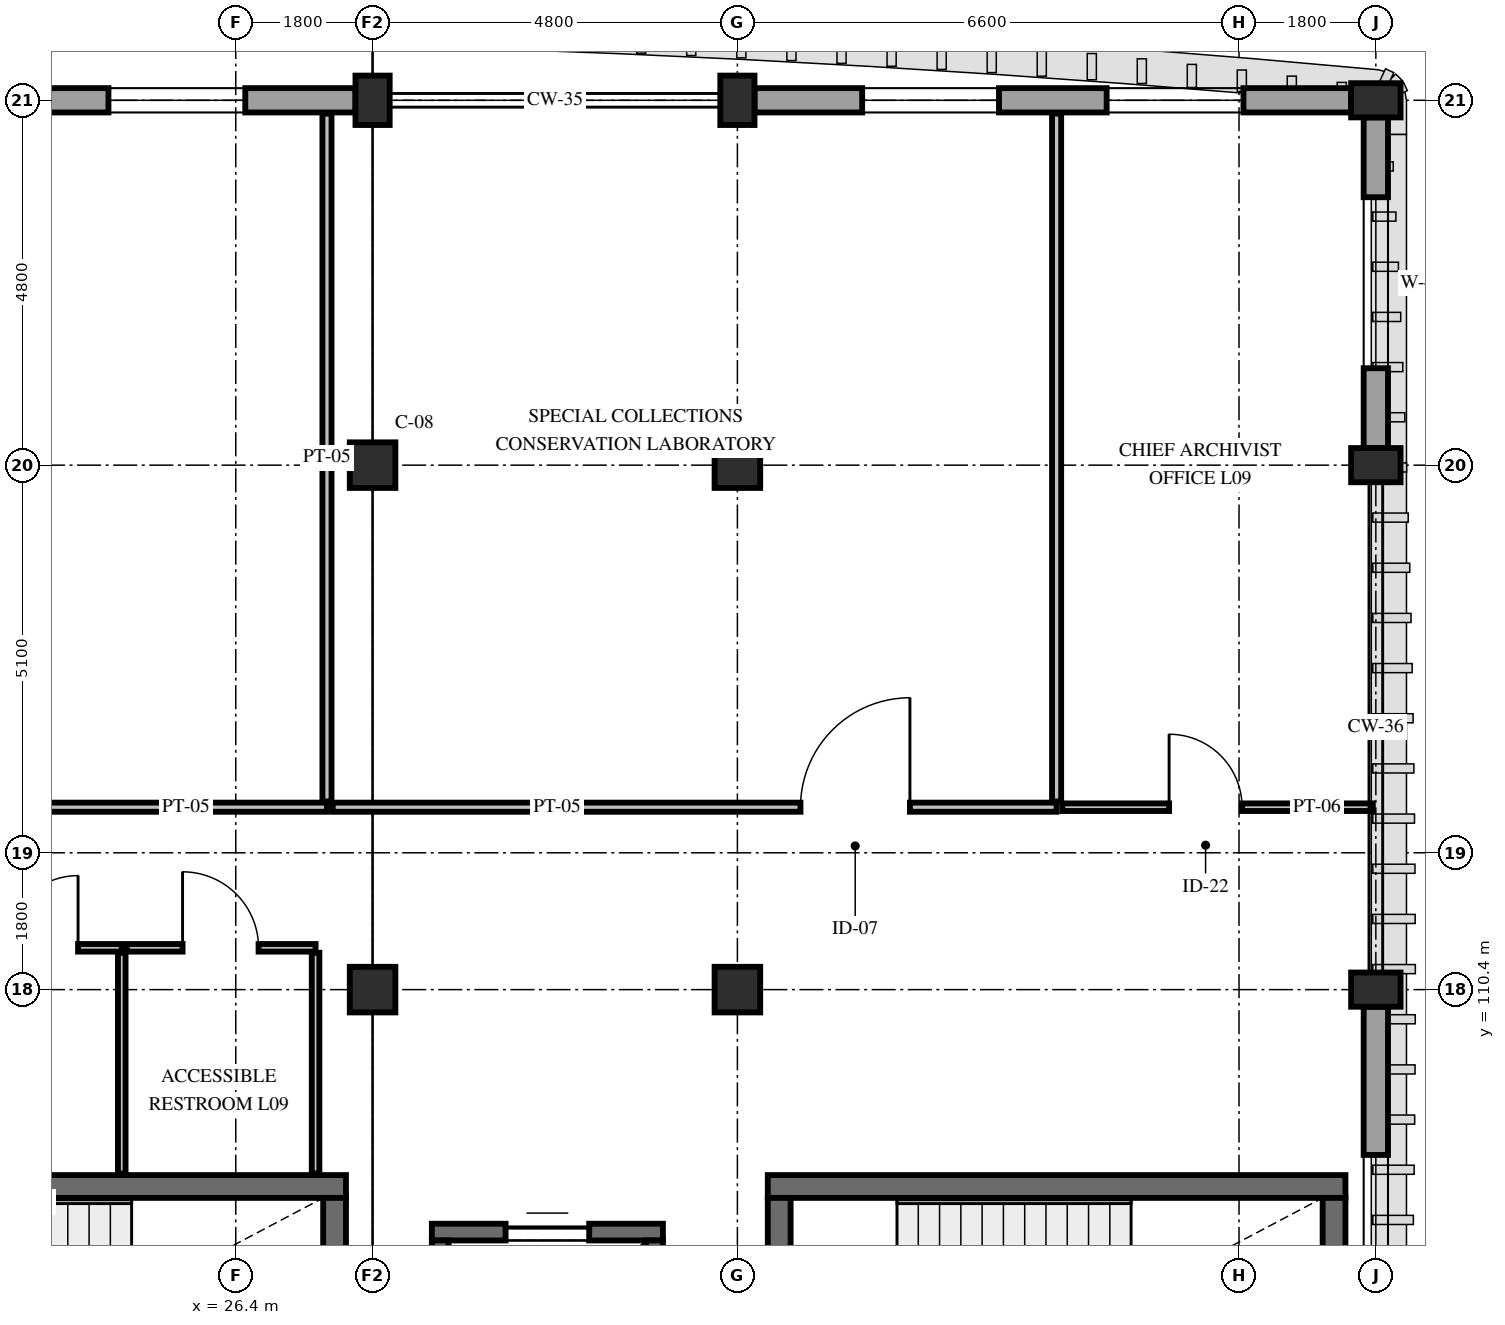
"""IFC4 building model, lengths in metres.
Left out: names, types, materials, properties, quantities, classifications, styles, units other than length and angle.
Written with IfcOpenShell. Run it as: python <this file> out.ifc"""

import sys

from ifc_helpers import new_model, si_unit, direction, frame, frame_2d, origin, origin_2d, place, context, subcontext, project, spatial, rectangle, extrude, element, fill, save


model = new_model("IFC4")
c1 = context("Model", 3, precision=1e-05, world=origin(), true_north=direction((0.0, 1.0)))
c2 = subcontext(c1, "Body", "Model", "MODEL_VIEW")
j1 = project(units=[si_unit("LENGTHUNIT", "METRE"), si_unit("PLANEANGLEUNIT", "RADIAN")], contexts=[c1])
p1 = place(None, origin())
s1 = spatial("IfcSite", under=j1, at=p1, CompositionType="ELEMENT")
p2 = place(p1, origin())
s2 = spatial("IfcBuilding", under=s1, at=p2, CompositionType="ELEMENT")
p3 = place(p2, frame((0.0, 0.0, 42.6)))
s3 = spatial("IfcBuildingStorey", under=s2, at=p3, CompositionType="ELEMENT", Elevation=42.6)
for number, where, z_axis, x_axis in (
    (1, (28.2, 110.4, 0.0), (0.0, 0.0, 1.0), (1.0, 0.0, 0.0)),
    (2, (28.2, 117.3, 0.0), (0.0, 0.0, 1.0), (1.0, 0.0, 0.0)),
):
    element("IfcColumn", number, at=place(p3, frame(where, z_axis=z_axis, x_axis=x_axis)), inside=s3, PredefinedType="COLUMN", context=c2, shape_type="SweptSolid", body=[
        extrude(rectangle(XDim=0.6, YDim=0.6, at=origin_2d()), origin(), (0.0, 0.0, 1.0), 4.2),
    ])
p4 = place(p3, frame((28.2, 122.1, 0.0), z_axis=(0.0, 0.0, 1.0), x_axis=(1.0, 0.0, 0.0)))
e3 = element("IfcColumn", 3, at=p4, inside=s3, PredefinedType="PILASTER", context=c2, shape_type="SweptSolid", body=[
    extrude(rectangle(XDim=0.45, YDim=0.65, at=origin_2d()), origin(), (0.0, 0.0, 1.0), 4.2),
])
for number, where, z_axis, x_axis in (
    (4, (33.0, 110.4, 0.0), (0.0, 0.0, 1.0), (1.0, 0.0, 0.0)),
    (5, (33.0, 117.3, 0.0), (0.0, 0.0, 1.0), (1.0, 0.0, 0.0)),
):
    element("IfcColumn", number, at=place(p3, frame(where, z_axis=z_axis, x_axis=x_axis)), inside=s3, PredefinedType="COLUMN", context=c2, shape_type="SweptSolid", body=[
        extrude(rectangle(XDim=0.6, YDim=0.6, at=origin_2d()), origin(), (0.0, 0.0, 1.0), 4.2),
    ])
for number, where, z_axis, x_axis in (
    (6, (33.0, 122.1, 0.0), (0.0, 0.0, 1.0), (1.0, 0.0, 0.0)),
    (7, (41.4, 110.4, 0.0), (0.0, 0.0, 1.0), (0.0, 1.0, 0.0)),
    (8, (41.4, 117.3, 0.0), (0.0, 0.0, 1.0), (0.0, 1.0, 0.0)),
    (9, (41.4, 122.1, 0.0), (0.0, 0.0, 1.0), (0.0, 1.0, 0.0)),
):
    element("IfcColumn", number, at=place(p3, frame(where, z_axis=z_axis, x_axis=x_axis)), inside=s3, PredefinedType="PILASTER", context=c2, shape_type="SweptSolid", body=[
        extrude(rectangle(XDim=0.45, YDim=0.65, at=origin_2d()), origin(), (0.0, 0.0, 1.0), 4.2),
    ])
p5 = place(p3, frame((20.025, 122.1, 0.0), z_axis=(0.0, 0.0, 1.0), x_axis=(1.0, 0.0, 0.0)))
e10 = element("IfcWall", 10, at=p5, inside=s3, PredefinedType="STANDARD", context=c2, shape_type="SweptSolid", body=[
    extrude(rectangle(XDim=7.95, YDim=0.32, at=frame_2d((3.975, 0.0))), origin(), (0.0, 0.0, 1.0), 3.35),
])
p6 = place(p5, frame((1.45, 0.0, 0.65)))
e11 = element("IfcOpeningElement", 11, at=p6, cuts=e10, PredefinedType="OPENING", context=c2, shape_type="SweptSolid", body=[
    extrude(rectangle(XDim=1.8, YDim=2.24, at=frame_2d((0.9, 1.12))), frame((0.0, 0.175, 0.0), z_axis=(0.0, -1.0, 0.0), x_axis=(1.0, 0.0, 0.0)), (0.0, 0.0, 1.0), 0.35),
])
p7 = place(p5, frame((4.7, 0.0, 0.65)))
e12 = element("IfcOpeningElement", 12, at=p7, cuts=e10, PredefinedType="OPENING", context=c2, shape_type="SweptSolid", body=[
    extrude(rectangle(XDim=1.8, YDim=2.24, at=frame_2d((0.9, 1.12))), frame((0.0, 0.175, 0.0), z_axis=(0.0, -1.0, 0.0), x_axis=(1.0, 0.0, 0.0)), (0.0, 0.0, 1.0), 0.35),
])
p8 = place(p3, frame((33.225, 122.1, 0.0), z_axis=(0.0, 0.0, 1.0), x_axis=(1.0, 0.0, 0.0)))
e13 = element("IfcWall", 13, at=p8, inside=s3, PredefinedType="STANDARD", context=c2, shape_type="SweptSolid", body=[
    extrude(rectangle(XDim=7.85, YDim=0.32, at=frame_2d((3.925, 0.0))), origin(), (0.0, 0.0, 1.0), 3.35),
])
p9 = place(p8, frame((1.417, 0.0, 0.65)))
e14 = element("IfcOpeningElement", 14, at=p9, cuts=e13, PredefinedType="OPENING", context=c2, shape_type="SweptSolid", body=[
    extrude(rectangle(XDim=1.8, YDim=2.24, at=frame_2d((0.9, 1.12))), frame((0.0, 0.175, 0.0), z_axis=(0.0, -1.0, 0.0), x_axis=(1.0, 0.0, 0.0)), (0.0, 0.0, 1.0), 0.35),
])
p10 = place(p8, frame((4.633, 0.0, 0.65)))
e15 = element("IfcOpeningElement", 15, at=p10, cuts=e13, PredefinedType="OPENING", context=c2, shape_type="SweptSolid", body=[
    extrude(rectangle(XDim=1.8, YDim=2.24, at=frame_2d((0.9, 1.12))), frame((0.0, 0.175, 0.0), z_axis=(0.0, -1.0, 0.0), x_axis=(1.0, 0.0, 0.0)), (0.0, 0.0, 1.0), 0.35),
])
p11 = place(p3, frame((41.4, 121.875, 0.0), z_axis=(0.0, 0.0, 1.0), x_axis=(0.0, -1.0, 0.0)))
e16 = element("IfcWall", 16, at=p11, inside=s3, PredefinedType="STANDARD", context=c2, shape_type="SweptSolid", body=[
    extrude(rectangle(XDim=4.35, YDim=0.32, at=frame_2d((2.175, 0.0))), origin(), (0.0, 0.0, 1.0), 3.35),
])
p12 = place(p11, frame((1.05, 0.0, 0.65)))
e17 = element("IfcOpeningElement", 17, at=p12, cuts=e16, PredefinedType="OPENING", context=c2, shape_type="SweptSolid", body=[
    extrude(rectangle(XDim=2.25, YDim=2.24, at=frame_2d((1.125, 1.12))), frame((0.0, 0.175, 0.0), z_axis=(0.0, -1.0, 0.0), x_axis=(1.0, 0.0, 0.0)), (0.0, 0.0, 1.0), 0.35),
])
p13 = place(p3, frame((41.4, 110.175, 0.0), z_axis=(0.0, 0.0, 1.0), x_axis=(0.0, -1.0, 0.0)))
e18 = element("IfcWall", 18, at=p13, inside=s3, PredefinedType="STANDARD", context=c2, shape_type="SweptSolid", body=[
    extrude(rectangle(XDim=6.15, YDim=0.32, at=frame_2d((3.075, 0.0))), origin(), (0.0, 0.0, 1.0), 3.23),
])
p14 = place(p13, frame((1.95, 0.0, 0.65)))
e19 = element("IfcOpeningElement", 19, at=p14, cuts=e18, PredefinedType="OPENING", context=c2, shape_type="SweptSolid", body=[
    extrude(rectangle(XDim=2.25, YDim=2.24, at=frame_2d((1.125, 1.12))), frame((0.0, 0.175, 0.0), z_axis=(0.0, -1.0, 0.0), x_axis=(1.0, 0.0, 0.0)), (0.0, 0.0, 1.0), 0.35),
])
p15 = place(p3, frame((20.25, 107.81, 0.0), z_axis=(0.0, 0.0, 1.0), x_axis=(1.0, 0.0, 0.0)))
e20 = element("IfcWall", 20, at=p15, inside=s3, PredefinedType="SHEAR", context=c2, shape_type="SweptSolid", body=[
    extrude(rectangle(XDim=7.6, YDim=0.3, at=frame_2d((3.8, 0.0))), origin(), (0.0, 0.0, 1.0), 3.9),
])
p16 = place(p3, frame((27.7, 104.7, 0.0), z_axis=(0.0, 0.0, 1.0), x_axis=(0.0, 1.0, 0.0)))
e21 = element("IfcWall", 21, at=p16, inside=s3, PredefinedType="SHEAR", context=c2, shape_type="SweptSolid", body=[
    extrude(rectangle(XDim=2.96, YDim=0.3, at=frame_2d((1.48, 0.0))), origin(), (0.0, 0.0, 1.0), 3.9),
])
p17 = place(p3, frame((33.4, 107.81, 0.0), z_axis=(0.0, 0.0, 1.0), x_axis=(1.0, 0.0, 0.0)))
e22 = element("IfcWall", 22, at=p17, inside=s3, PredefinedType="SHEAR", context=c2, shape_type="SweptSolid", body=[
    extrude(rectangle(XDim=7.6, YDim=0.3, at=frame_2d((3.8, 0.0))), origin(), (0.0, 0.0, 1.0), 3.9),
])
p18 = place(p3, frame((33.55, 104.7, 0.0), z_axis=(0.0, 0.0, 1.0), x_axis=(0.0, 1.0, 0.0)))
e23 = element("IfcWall", 23, at=p18, inside=s3, PredefinedType="SHEAR", context=c2, shape_type="SweptSolid", body=[
    extrude(rectangle(XDim=2.96, YDim=0.3, at=frame_2d((1.48, 0.0))), origin(), (0.0, 0.0, 1.0), 3.9),
])
p19 = place(p18, frame((0.94, 0.0, 0.0)))
e24 = element("IfcOpeningElement", 24, at=p19, cuts=e23, PredefinedType="OPENING", context=c2, shape_type="SweptSolid", body=[
    extrude(rectangle(XDim=1.08, YDim=2.2, at=frame_2d((0.54, 1.1))), frame((0.0, 0.165, 0.0), z_axis=(0.0, -1.0, 0.0), x_axis=(1.0, 0.0, 0.0)), (0.0, 0.0, 1.0), 0.33),
])
p20 = place(p3, frame((40.85, 104.7, 0.0), z_axis=(0.0, 0.0, 1.0), x_axis=(0.0, 1.0, 0.0)))
e25 = element("IfcWall", 25, at=p20, inside=s3, PredefinedType="SHEAR", context=c2, shape_type="SweptSolid", body=[
    extrude(rectangle(XDim=2.96, YDim=0.3, at=frame_2d((1.48, 0.0))), origin(), (0.0, 0.0, 1.0), 3.9),
])
p21 = place(p3, frame((28.98, 107.21, 0.0), z_axis=(0.0, 0.0, 1.0), x_axis=(1.0, 0.0, 0.0)))
e26 = element("IfcWall", 26, at=p21, inside=s3, PredefinedType="SHEAR", context=c2, shape_type="SweptSolid", body=[
    extrude(rectangle(XDim=3.04, YDim=0.22, at=frame_2d((1.52, 0.0))), origin(), (0.0, 0.0, 1.0), 3.9),
])
p22 = place(p21, frame((0.97, 0.0, 0.0)))
e27 = element("IfcOpeningElement", 27, at=p22, cuts=e26, PredefinedType="OPENING", context=c2, shape_type="SweptSolid", body=[
    extrude(rectangle(XDim=1.1, YDim=2.2, at=frame_2d((0.55, 1.1))), frame((0.0, 0.125, 0.0), z_axis=(0.0, -1.0, 0.0), x_axis=(1.0, 0.0, 0.0)), (0.0, 0.0, 1.0), 0.25),
])
for number, where, z_axis, x_axis in (
    (28, (29.09, 104.7, 0.0), (0.0, 0.0, 1.0), (0.0, 1.0, 0.0)),
    (29, (31.91, 104.7, 0.0), (0.0, 0.0, 1.0), (0.0, 1.0, 0.0)),
):
    element("IfcWall", number, at=place(p3, frame(where, z_axis=z_axis, x_axis=x_axis)), inside=s3, PredefinedType="SHEAR", context=c2, shape_type="SweptSolid", body=[
        extrude(rectangle(XDim=2.4, YDim=0.22, at=frame_2d((1.2, 0.0))), origin(), (0.0, 0.0, 1.0), 3.9),
    ])
p23 = place(p3, frame((22.815, 110.95, 0.0), z_axis=(0.0, 0.0, 1.0), x_axis=(1.0, 0.0, 0.0)))
e30 = element("IfcWall", 30, at=p23, inside=s3, PredefinedType="PARTITIONING", context=c2, shape_type="SweptSolid", body=[
    extrude(rectangle(XDim=2.085, YDim=0.1, at=frame_2d((1.042, 0.0))), origin(), (0.0, 0.0, 1.0), 3.88),
])
p24 = place(p23, frame((0.56, 0.0, 0.0)))
e31 = element("IfcOpeningElement", 31, at=p24, cuts=e30, PredefinedType="OPENING", context=c2, shape_type="SweptSolid", body=[
    extrude(rectangle(XDim=0.95, YDim=2.15, at=frame_2d((0.475, 1.075))), frame((0.0, 0.065, 0.0), z_axis=(0.0, -1.0, 0.0), x_axis=(1.0, 0.0, 0.0)), (0.0, 0.0, 1.0), 0.13),
])
p25 = place(p3, frame((24.9, 107.98, 0.0), z_axis=(0.0, 0.0, 1.0), x_axis=(0.0, 1.0, 0.0)))
e32 = element("IfcWall", 32, at=p25, inside=s3, PredefinedType="PARTITIONING", context=c2, shape_type="SweptSolid", body=[
    extrude(rectangle(XDim=2.905, YDim=0.1, at=frame_2d((1.453, 0.0))), origin(), (0.0, 0.0, 1.0), 3.23),
])
p26 = place(p3, frame((24.965, 110.95, 0.0), z_axis=(0.0, 0.0, 1.0), x_axis=(1.0, 0.0, 0.0)))
e33 = element("IfcWall", 33, at=p26, inside=s3, PredefinedType="PARTITIONING", context=c2, shape_type="SweptSolid", body=[
    extrude(rectangle(XDim=2.485, YDim=0.1, at=frame_2d((1.242, 0.0))), origin(), (0.0, 0.0, 1.0), 3.745),
])
p27 = place(p26, frame((0.735, 0.0, 0.0)))
e34 = element("IfcOpeningElement", 34, at=p27, cuts=e33, PredefinedType="OPENING", context=c2, shape_type="SweptSolid", body=[
    extrude(rectangle(XDim=1.0, YDim=2.15, at=frame_2d((0.5, 1.075))), frame((0.0, 0.065, 0.0), z_axis=(0.0, -1.0, 0.0), x_axis=(1.0, 0.0, 0.0)), (0.0, 0.0, 1.0), 0.13),
])
p28 = place(p3, frame((27.45, 107.98, 0.0), z_axis=(0.0, 0.0, 1.0), x_axis=(0.0, 1.0, 0.0)))
e35 = element("IfcWall", 35, at=p28, inside=s3, PredefinedType="PARTITIONING", context=c2, shape_type="SweptSolid", body=[
    extrude(rectangle(XDim=2.905, YDim=0.1, at=frame_2d((1.453, 0.0))), origin(), (0.0, 0.0, 1.0), 3.23),
])
p29 = place(p3, frame((18.215, 112.8, 0.0), z_axis=(0.0, 0.0, 1.0), x_axis=(1.0, 0.0, 0.0)))
e36 = element("IfcWall", 36, at=p29, inside=s3, PredefinedType="PARTITIONING", context=c2, shape_type="SweptSolid", body=[
    extrude(rectangle(XDim=9.385, YDim=0.12, at=frame_2d((4.692, 0.0))), origin(), (0.0, 0.0, 1.0), 3.53),
])
p30 = place(p29, frame((3.945, 0.0, 0.0)))
e37 = element("IfcOpeningElement", 37, at=p30, cuts=e36, PredefinedType="OPENING", context=c2, shape_type="SweptSolid", body=[
    extrude(rectangle(XDim=1.48, YDim=2.3, at=frame_2d((0.74, 1.15))), frame((0.0, 0.075, 0.0), z_axis=(0.0, -1.0, 0.0), x_axis=(1.0, 0.0, 0.0)), (0.0, 0.0, 1.0), 0.15),
])
p31 = place(p3, frame((27.6, 112.875, 0.0), z_axis=(0.0, 0.0, 1.0), x_axis=(0.0, 1.0, 0.0)))
e38 = element("IfcWall", 38, at=p31, inside=s3, PredefinedType="PARTITIONING", context=c2, shape_type="SweptSolid", body=[
    extrude(rectangle(XDim=9.05, YDim=0.12, at=frame_2d((4.525, 0.0))), origin(), (0.0, 0.0, 1.0), 3.33),
])
p32 = place(p3, frame((27.675, 112.8, 0.0), z_axis=(0.0, 0.0, 1.0), x_axis=(1.0, 0.0, 0.0)))
e39 = element("IfcWall", 39, at=p32, inside=s3, PredefinedType="PARTITIONING", context=c2, shape_type="SweptSolid", body=[
    extrude(rectangle(XDim=9.525, YDim=0.12, at=frame_2d((4.762, 0.0))), origin(), (0.0, 0.0, 1.0), 3.53),
])
p33 = place(p32, frame((6.155, 0.0, 0.0)))
e40 = element("IfcOpeningElement", 40, at=p33, cuts=e39, PredefinedType="OPENING", context=c2, shape_type="SweptSolid", body=[
    extrude(rectangle(XDim=1.44, YDim=2.25, at=frame_2d((0.72, 1.125))), frame((0.0, 0.075, 0.0), z_axis=(0.0, -1.0, 0.0), x_axis=(1.0, 0.0, 0.0)), (0.0, 0.0, 1.0), 0.15),
])
p34 = place(p3, frame((37.2, 112.875, 0.0), z_axis=(0.0, 0.0, 1.0), x_axis=(0.0, 1.0, 0.0)))
e41 = element("IfcWall", 41, at=p34, inside=s3, PredefinedType="PARTITIONING", context=c2, shape_type="SweptSolid", body=[
    extrude(rectangle(XDim=9.05, YDim=0.12, at=frame_2d((4.525, 0.0))), origin(), (0.0, 0.0, 1.0), 3.33),
])
p35 = place(p3, frame((37.275, 112.8, 0.0), z_axis=(0.0, 0.0, 1.0), x_axis=(1.0, 0.0, 0.0)))
e42 = element("IfcWall", 42, at=p35, inside=s3, PredefinedType="PARTITIONING", context=c2, shape_type="SweptSolid", body=[
    extrude(rectangle(XDim=4.085, YDim=0.1, at=frame_2d((2.042, 0.0))), origin(), (0.0, 0.0, 1.0), 3.48),
])
p36 = place(p35, frame((1.405, 0.0, 0.0)))
e43 = element("IfcOpeningElement", 43, at=p36, cuts=e42, PredefinedType="OPENING", context=c2, shape_type="SweptSolid", body=[
    extrude(rectangle(XDim=0.96, YDim=2.15, at=frame_2d((0.48, 1.075))), frame((0.0, 0.065, 0.0), z_axis=(0.0, -1.0, 0.0), x_axis=(1.0, 0.0, 0.0)), (0.0, 0.0, 1.0), 0.13),
])
p37 = place(p7, origin())
e44 = element("IfcWindow", 44, at=p37, inside=s3, PartitioningType="DOUBLE_PANEL_VERTICAL", PredefinedType="WINDOW", context=c2, shape_type="SweptSolid", body=[
    extrude(rectangle(XDim=1.8, YDim=2.24, at=frame_2d((0.9, 1.12))), frame((0.0, 0.03, 0.0), z_axis=(0.0, -1.0, 0.0), x_axis=(1.0, 0.0, 0.0)), (0.0, 0.0, 1.0), 0.06),
])
fill(e12, e44)
p38 = place(p9, origin())
e45 = element("IfcWindow", 45, at=p38, inside=s3, PartitioningType="DOUBLE_PANEL_VERTICAL", PredefinedType="WINDOW", context=c2, shape_type="SweptSolid", body=[
    extrude(rectangle(XDim=1.8, YDim=2.24, at=frame_2d((0.9, 1.12))), frame((0.0, 0.03, 0.0), z_axis=(0.0, -1.0, 0.0), x_axis=(1.0, 0.0, 0.0)), (0.0, 0.0, 1.0), 0.06),
])
fill(e14, e45)
p39 = place(p10, origin())
e46 = element("IfcWindow", 46, at=p39, inside=s3, PartitioningType="DOUBLE_PANEL_VERTICAL", PredefinedType="WINDOW", context=c2, shape_type="SweptSolid", body=[
    extrude(rectangle(XDim=1.8, YDim=2.24, at=frame_2d((0.9, 1.12))), frame((0.0, 0.03, 0.0), z_axis=(0.0, -1.0, 0.0), x_axis=(1.0, 0.0, 0.0)), (0.0, 0.0, 1.0), 0.06),
])
fill(e15, e46)
p40 = place(p12, origin())
e47 = element("IfcWindow", 47, at=p40, inside=s3, PartitioningType="DOUBLE_PANEL_VERTICAL", PredefinedType="WINDOW", context=c2, shape_type="SweptSolid", body=[
    extrude(rectangle(XDim=2.25, YDim=2.24, at=frame_2d((1.125, 1.12))), frame((0.0, 0.03, 0.0), z_axis=(0.0, -1.0, 0.0), x_axis=(1.0, 0.0, 0.0)), (0.0, 0.0, 1.0), 0.06),
])
fill(e17, e47)
p41 = place(p14, origin())
e48 = element("IfcWindow", 48, at=p41, inside=s3, PartitioningType="DOUBLE_PANEL_VERTICAL", PredefinedType="WINDOW", context=c2, shape_type="SweptSolid", body=[
    extrude(rectangle(XDim=2.25, YDim=2.24, at=frame_2d((1.125, 1.12))), frame((0.0, 0.03, 0.0), z_axis=(0.0, -1.0, 0.0), x_axis=(1.0, 0.0, 0.0)), (0.0, 0.0, 1.0), 0.06),
])
fill(e19, e48)
p42 = place(p22, origin())
e49 = element("IfcDoor", 49, at=p42, inside=s3, OperationType="SLIDING_TO_LEFT", PredefinedType="DOOR", context=c2, shape_type="SweptSolid", body=[
    extrude(rectangle(XDim=1.1, YDim=2.2, at=frame_2d((0.55, 1.1))), frame((0.0, 0.025, 0.0), z_axis=(0.0, -1.0, 0.0), x_axis=(1.0, 0.0, 0.0)), (0.0, 0.0, 1.0), 0.05),
])
fill(e27, e49)
p43 = place(p24, origin())
e50 = element("IfcDoor", 50, at=p43, inside=s3, OperationType="SINGLE_SWING_RIGHT", PredefinedType="DOOR", context=c2, shape_type="SweptSolid", body=[
    extrude(rectangle(XDim=0.95, YDim=2.15, at=frame_2d((0.475, 1.075))), frame((0.0, 0.025, 0.0), z_axis=(0.0, -1.0, 0.0), x_axis=(1.0, 0.0, 0.0)), (0.0, 0.0, 1.0), 0.05),
])
fill(e31, e50)
p44 = place(p27, origin())
e51 = element("IfcDoor", 51, at=p44, inside=s3, OperationType="SINGLE_SWING_LEFT", PredefinedType="DOOR", context=c2, shape_type="SweptSolid", body=[
    extrude(rectangle(XDim=1.0, YDim=2.15, at=frame_2d((0.5, 1.075))), frame((0.0, 0.025, 0.0), z_axis=(0.0, -1.0, 0.0), x_axis=(1.0, 0.0, 0.0)), (0.0, 0.0, 1.0), 0.05),
])
fill(e34, e51)
p45 = place(p33, origin())
e52 = element("IfcDoor", 52, at=p45, inside=s3, OperationType="SINGLE_SWING_RIGHT", PredefinedType="DOOR", context=c2, shape_type="SweptSolid", body=[
    extrude(rectangle(XDim=1.44, YDim=2.25, at=frame_2d((0.72, 1.125))), frame((0.0, 0.025, 0.0), z_axis=(0.0, -1.0, 0.0), x_axis=(1.0, 0.0, 0.0)), (0.0, 0.0, 1.0), 0.05),
])
fill(e40, e52)
p46 = place(p36, origin())
e53 = element("IfcDoor", 53, at=p46, inside=s3, OperationType="SINGLE_SWING_LEFT", PredefinedType="DOOR", context=c2, shape_type="SweptSolid", body=[
    extrude(rectangle(XDim=0.96, YDim=2.15, at=frame_2d((0.48, 1.075))), frame((0.0, 0.025, 0.0), z_axis=(0.0, -1.0, 0.0), x_axis=(1.0, 0.0, 0.0)), (0.0, 0.0, 1.0), 0.05),
])
fill(e43, e53)
save(model, sys.argv[1])
